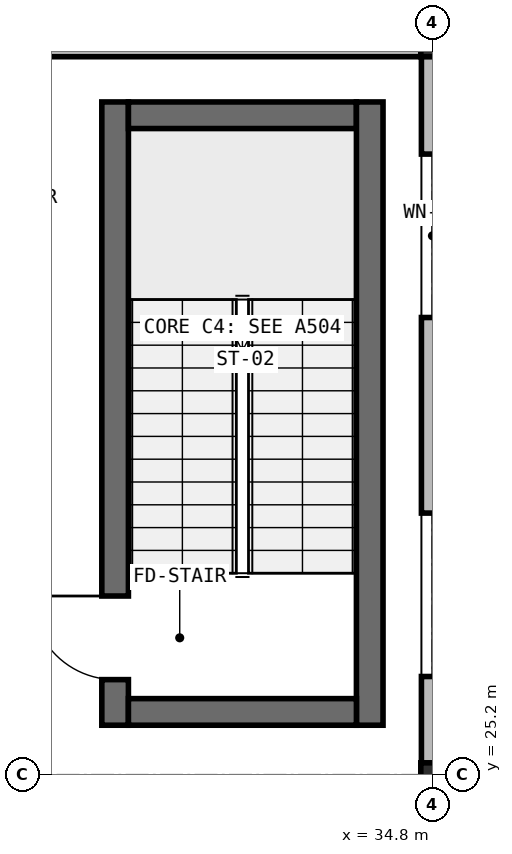
"""IFC4 building model, lengths in metres.
Left out: names, types, materials, properties, quantities, classifications, styles, units other than length and angle.
Written with IfcOpenShell. Run it as: python <this file> out.ifc"""

import sys

from ifc_helpers import new_model, si_unit, direction, frame, frame_2d, origin, origin_2d, place, context, subcontext, project, spatial, rectangle, i_section, extrude, element, fill, save


model = new_model("IFC4")
c1 = context("Model", 3, precision=1e-05, world=origin(), true_north=direction((0.0, 1.0)))
c2 = subcontext(c1, "Body", "Model", "MODEL_VIEW")
j1 = project(units=[si_unit("LENGTHUNIT", "METRE"), si_unit("PLANEANGLEUNIT", "RADIAN")], contexts=[c1])
p1 = place(None, origin())
s1 = spatial("IfcSite", under=j1, at=p1, CompositionType="ELEMENT")
p2 = place(p1, origin())
s2 = spatial("IfcBuilding", under=s1, at=p2, CompositionType="ELEMENT")
p3 = place(p2, frame((0.0, 0.0, 5.25)))
s3 = spatial("IfcBuildingStorey", under=s2, at=p3, CompositionType="ELEMENT", Elevation=5.25)
p4 = place(p3, frame((30.625, 25.85, 0.0), z_axis=(0.0, 0.0, 1.0), x_axis=(0.0, 1.0, 0.0)))
e1 = element("IfcWall", 1, at=p4, inside=s3, PredefinedType="SHEAR", context=c2, shape_type="SweptSolid", body=[
    extrude(rectangle(XDim=8.2, YDim=0.35, at=frame_2d((4.1, 0.0))), origin(), (0.0, 0.0, 1.0), 4.55),
])
p5 = place(p4, frame((0.6, 0.0, 0.0)))
e2 = element("IfcOpeningElement", 2, at=p5, cuts=e1, PredefinedType="OPENING", context=c2, shape_type="SweptSolid", body=[
    extrude(rectangle(XDim=1.1, YDim=2.15, at=frame_2d((0.55, 1.075))), frame((0.0, 0.185, 0.0), z_axis=(0.0, -1.0, 0.0), x_axis=(1.0, 0.0, 0.0)), (0.0, 0.0, 1.0), 0.37),
])
p6 = place(p3, frame((30.8, 33.875, 0.0), z_axis=(0.0, 0.0, 1.0), x_axis=(1.0, 0.0, 0.0)))
e3 = element("IfcWall", 3, at=p6, inside=s3, PredefinedType="SHEAR", context=c2, shape_type="SweptSolid", body=[
    extrude(rectangle(XDim=3.0, YDim=0.35, at=frame_2d((1.5, 0.0))), origin(), (0.0, 0.0, 1.0), 4.55),
])
p7 = place(p3, frame((33.975, 34.05, 0.0), z_axis=(0.0, 0.0, 1.0), x_axis=(0.0, -1.0, 0.0)))
e4 = element("IfcWall", 4, at=p7, inside=s3, PredefinedType="SHEAR", context=c2, shape_type="SweptSolid", body=[
    extrude(rectangle(XDim=8.2, YDim=0.35, at=frame_2d((4.1, 0.0))), origin(), (0.0, 0.0, 1.0), 4.55),
])
p8 = place(p3, frame((33.8, 26.025, 0.0), z_axis=(0.0, 0.0, 1.0), x_axis=(-1.0, 0.0, 0.0)))
e5 = element("IfcWall", 5, at=p8, inside=s3, PredefinedType="SHEAR", context=c2, shape_type="SweptSolid", body=[
    extrude(rectangle(XDim=3.0, YDim=0.35, at=frame_2d((1.5, 0.0))), origin(), (0.0, 0.0, 1.0), 4.55),
])
for number, where, z_axis, x_axis in (
    (6, (34.8, 25.2, 0.0), (0.0, 0.0, 1.0), (1.0, 0.0, 0.0)),
    (7, (34.8, 34.8, 0.0), (0.0, 0.0, 1.0), (1.0, 0.0, 0.0)),
):
    element("IfcColumn", number, at=place(p3, frame(where, z_axis=z_axis, x_axis=x_axis)), inside=s3, PredefinedType="COLUMN", context=c2, shape_type="SweptSolid", body=[
        extrude(i_section(OverallWidth=0.306, OverallDepth=0.311, WebThickness=0.011, FlangeThickness=0.017, at=origin_2d()), origin(), (0.0, 0.0, 1.0), 4.55),
    ])
p9 = place(p3, frame((25.204, 34.8, 0.0), z_axis=(0.0, 0.0, 1.0), x_axis=(1.0, 0.0, 0.0)))
e8 = element("IfcWall", 8, at=p9, inside=s3, PredefinedType="SOLIDWALL", context=c2, shape_type="SweptSolid", body=[
    extrude(rectangle(XDim=9.751, YDim=0.31, at=frame_2d((4.875, 0.0))), origin(), (0.0, 0.0, 1.0), 3.884),
])
p10 = place(p9, frame((1.528, 0.0, 0.95)))
e9 = element("IfcOpeningElement", 9, at=p10, cuts=e8, PredefinedType="OPENING", context=c2, shape_type="SweptSolid", body=[
    extrude(rectangle(XDim=1.82, YDim=1.4, at=frame_2d((0.91, 0.7))), frame((0.0, 0.165, 0.0), z_axis=(0.0, -1.0, 0.0), x_axis=(1.0, 0.0, 0.0)), (0.0, 0.0, 1.0), 0.33),
])
p11 = place(p3, frame((34.8, 34.651, 0.0), z_axis=(0.0, 0.0, 1.0), x_axis=(0.0, -1.0, 0.0)))
e10 = element("IfcWall", 10, at=p11, inside=s3, PredefinedType="SOLIDWALL", context=c2, shape_type="SweptSolid", body=[
    extrude(rectangle(XDim=9.447, YDim=0.29, at=frame_2d((4.723, 0.0))), origin(), (0.0, 0.0, 1.0), 3.884),
])
p12 = place(p11, frame((1.287, 0.0, 0.95)))
e11 = element("IfcOpeningElement", 11, at=p12, cuts=e10, PredefinedType="OPENING", context=c2, shape_type="SweptSolid", body=[
    extrude(rectangle(XDim=2.15, YDim=1.8, at=frame_2d((1.075, 0.9))), frame((0.0, 0.155, 0.0), z_axis=(0.0, -1.0, 0.0), x_axis=(1.0, 0.0, 0.0)), (0.0, 0.0, 1.0), 0.31),
])
p13 = place(p11, frame((6.01, 0.0, 0.95)))
e12 = element("IfcOpeningElement", 12, at=p13, cuts=e10, PredefinedType="OPENING", context=c2, shape_type="SweptSolid", body=[
    extrude(rectangle(XDim=2.15, YDim=1.8, at=frame_2d((1.075, 0.9))), frame((0.0, 0.155, 0.0), z_axis=(0.0, -1.0, 0.0), x_axis=(1.0, 0.0, 0.0)), (0.0, 0.0, 1.0), 0.31),
])
p14 = place(p12, origin())
e13 = element("IfcWindow", 13, at=p14, inside=s3, PartitioningType="SINGLE_PANEL", PredefinedType="WINDOW", context=c2, shape_type="SweptSolid", body=[
    extrude(rectangle(XDim=2.15, YDim=1.8, at=frame_2d((1.075, 0.9))), frame((0.0, 0.03, 0.0), z_axis=(0.0, -1.0, 0.0), x_axis=(1.0, 0.0, 0.0)), (0.0, 0.0, 1.0), 0.06),
])
fill(e11, e13)
p15 = place(p13, origin())
e14 = element("IfcWindow", 14, at=p15, inside=s3, PartitioningType="SINGLE_PANEL", PredefinedType="WINDOW", context=c2, shape_type="SweptSolid", body=[
    extrude(rectangle(XDim=2.15, YDim=1.8, at=frame_2d((1.075, 0.9))), frame((0.0, 0.03, 0.0), z_axis=(0.0, -1.0, 0.0), x_axis=(1.0, 0.0, 0.0)), (0.0, 0.0, 1.0), 0.06),
])
fill(e12, e14)
p16 = place(p5, origin())
e15 = element("IfcDoor", 15, at=p16, inside=s3, OperationType="SINGLE_SWING_RIGHT", PredefinedType="DOOR", context=c2, shape_type="SweptSolid", body=[
    extrude(rectangle(XDim=1.1, YDim=2.15, at=frame_2d((0.55, 1.075))), frame((0.0, 0.025, 0.0), z_axis=(0.0, -1.0, 0.0), x_axis=(1.0, 0.0, 0.0)), (0.0, 0.0, 1.0), 0.05),
])
fill(e2, e15)
save(model, sys.argv[1])
